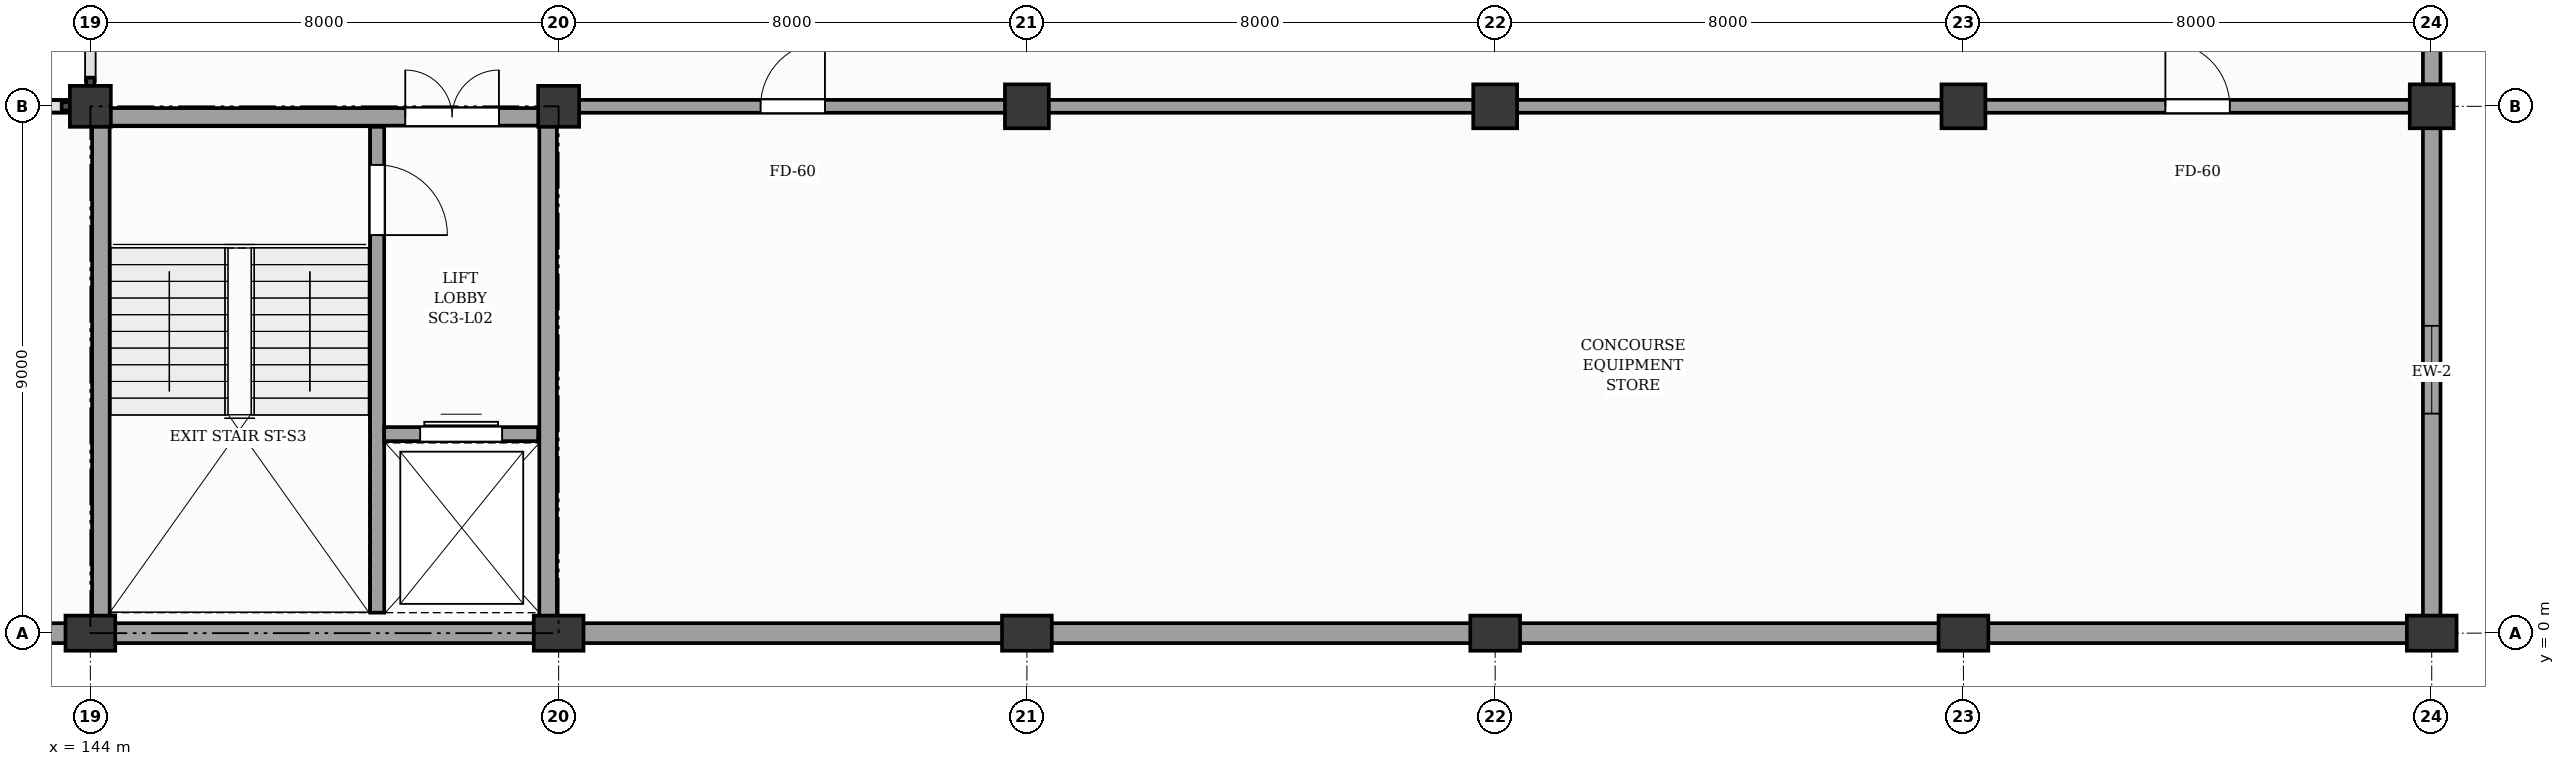
"""IFC4 building model, lengths in metres.
Left out: names, types, materials, properties, quantities, classifications, styles, units other than length and angle.
Written with IfcOpenShell. Run it as: python <this file> out.ifc"""

import sys

from ifc_helpers import new_model, si_unit, direction, frame, frame_2d, origin, origin_2d, place, context, subcontext, project, spatial, rectangle, extrude, element, fill, save


model = new_model("IFC4")
c1 = context("Model", 3, precision=1e-05, world=origin(), true_north=direction((0.0, 1.0)))
c2 = subcontext(c1, "Body", "Model", "MODEL_VIEW")
j1 = project(units=[si_unit("LENGTHUNIT", "METRE"), si_unit("PLANEANGLEUNIT", "RADIAN")], contexts=[c1])
p1 = place(None, origin())
s1 = spatial("IfcSite", under=j1, at=p1, CompositionType="ELEMENT")
p2 = place(p1, origin())
s2 = spatial("IfcBuilding", under=s1, at=p2, CompositionType="ELEMENT")
p3 = place(p2, frame((0.0, 0.0, 9.6)))
s3 = spatial("IfcBuildingStorey", under=s2, at=p3, CompositionType="ELEMENT", Elevation=9.6)
p4 = place(p3, frame((144.0, 0.0, 0.0), z_axis=(0.0, 0.0, 1.0), x_axis=(1.0, 0.0, 0.0)))
e1 = element("IfcColumn", 1, at=p4, inside=s3, PredefinedType="PILASTER", context=c2, shape_type="SweptSolid", body=[
    extrude(rectangle(XDim=0.85, YDim=0.6, at=origin_2d()), origin(), (0.0, 0.0, 1.0), 6.6),
])
p5 = place(p3, frame((144.0, 9.0, 0.0), z_axis=(0.0, 0.0, 1.0), x_axis=(1.0, 0.0, 0.0)))
e2 = element("IfcColumn", 2, at=p5, inside=s3, PredefinedType="COLUMN", context=c2, shape_type="SweptSolid", body=[
    extrude(rectangle(XDim=0.7, YDim=0.7, at=origin_2d()), origin(), (0.0, 0.0, 1.0), 6.6),
])
p6 = place(p3, frame((152.0, 0.0, 0.0), z_axis=(0.0, 0.0, 1.0), x_axis=(1.0, 0.0, 0.0)))
e3 = element("IfcColumn", 3, at=p6, inside=s3, PredefinedType="PILASTER", context=c2, shape_type="SweptSolid", body=[
    extrude(rectangle(XDim=0.85, YDim=0.6, at=origin_2d()), origin(), (0.0, 0.0, 1.0), 6.6),
])
p7 = place(p3, frame((152.0, 9.0, 0.0), z_axis=(0.0, 0.0, 1.0), x_axis=(1.0, 0.0, 0.0)))
e4 = element("IfcColumn", 4, at=p7, inside=s3, PredefinedType="COLUMN", context=c2, shape_type="SweptSolid", body=[
    extrude(rectangle(XDim=0.7, YDim=0.7, at=origin_2d()), origin(), (0.0, 0.0, 1.0), 6.6),
])
p8 = place(p3, frame((160.0, 0.0, 0.0), z_axis=(0.0, 0.0, 1.0), x_axis=(1.0, 0.0, 0.0)))
e5 = element("IfcColumn", 5, at=p8, inside=s3, PredefinedType="PILASTER", context=c2, shape_type="SweptSolid", body=[
    extrude(rectangle(XDim=0.85, YDim=0.6, at=origin_2d()), origin(), (0.0, 0.0, 1.0), 6.6),
])
p9 = place(p3, frame((160.0, 9.0, 0.0), z_axis=(0.0, 0.0, 1.0), x_axis=(1.0, 0.0, 0.0)))
e6 = element("IfcColumn", 6, at=p9, inside=s3, PredefinedType="COLUMN", context=c2, shape_type="SweptSolid", body=[
    extrude(rectangle(XDim=0.75, YDim=0.75, at=origin_2d()), origin(), (0.0, 0.0, 1.0), 6.6),
])
p10 = place(p3, frame((168.0, 0.0, 0.0), z_axis=(0.0, 0.0, 1.0), x_axis=(1.0, 0.0, 0.0)))
e7 = element("IfcColumn", 7, at=p10, inside=s3, PredefinedType="PILASTER", context=c2, shape_type="SweptSolid", body=[
    extrude(rectangle(XDim=0.85, YDim=0.6, at=origin_2d()), origin(), (0.0, 0.0, 1.0), 6.6),
])
p11 = place(p3, frame((168.0, 9.0, 0.0), z_axis=(0.0, 0.0, 1.0), x_axis=(1.0, 0.0, 0.0)))
e8 = element("IfcColumn", 8, at=p11, inside=s3, PredefinedType="COLUMN", context=c2, shape_type="SweptSolid", body=[
    extrude(rectangle(XDim=0.75, YDim=0.75, at=origin_2d()), origin(), (0.0, 0.0, 1.0), 6.6),
])
p12 = place(p3, frame((176.0, 0.0, 0.0), z_axis=(0.0, 0.0, 1.0), x_axis=(1.0, 0.0, 0.0)))
e9 = element("IfcColumn", 9, at=p12, inside=s3, PredefinedType="PILASTER", context=c2, shape_type="SweptSolid", body=[
    extrude(rectangle(XDim=0.85, YDim=0.6, at=origin_2d()), origin(), (0.0, 0.0, 1.0), 6.6),
])
p13 = place(p3, frame((176.0, 9.0, 0.0), z_axis=(0.0, 0.0, 1.0), x_axis=(1.0, 0.0, 0.0)))
e10 = element("IfcColumn", 10, at=p13, inside=s3, PredefinedType="COLUMN", context=c2, shape_type="SweptSolid", body=[
    extrude(rectangle(XDim=0.75, YDim=0.75, at=origin_2d()), origin(), (0.0, 0.0, 1.0), 6.6),
])
p14 = place(p3, frame((184.0, 0.0, 0.0), z_axis=(0.0, 0.0, 1.0), x_axis=(1.0, 0.0, 0.0)))
e11 = element("IfcColumn", 11, at=p14, inside=s3, PredefinedType="PILASTER", context=c2, shape_type="SweptSolid", body=[
    extrude(rectangle(XDim=0.85, YDim=0.6, at=origin_2d()), origin(), (0.0, 0.0, 1.0), 6.6),
])
p15 = place(p3, frame((184.0, 9.0, 0.0), z_axis=(0.0, 0.0, 1.0), x_axis=(1.0, 0.0, 0.0)))
e12 = element("IfcColumn", 12, at=p15, inside=s3, PredefinedType="COLUMN", context=c2, shape_type="SweptSolid", body=[
    extrude(rectangle(XDim=0.75, YDim=0.75, at=origin_2d()), origin(), (0.0, 0.0, 1.0), 6.6),
])
for number, where, z_axis, x_axis in (
    (13, (136.4, 0.0, 0.0), (0.0, 0.0, 1.0), (1.0, 0.0, 0.0)),
    (14, (144.4, 0.0, 0.0), (0.0, 0.0, 1.0), (1.0, 0.0, 0.0)),
    (15, (152.4, 0.0, 0.0), (0.0, 0.0, 1.0), (1.0, 0.0, 0.0)),
    (16, (160.4, 0.0, 0.0), (0.0, 0.0, 1.0), (1.0, 0.0, 0.0)),
    (17, (168.4, 0.0, 0.0), (0.0, 0.0, 1.0), (1.0, 0.0, 0.0)),
    (18, (176.4, 0.0, 0.0), (0.0, 0.0, 1.0), (1.0, 0.0, 0.0)),
):
    element("IfcWall", number, at=place(p3, frame(where, z_axis=z_axis, x_axis=x_axis)), inside=s3, PredefinedType="SOLIDWALL", context=c2, shape_type="SweptSolid", body=[
        extrude(rectangle(XDim=7.2, YDim=0.34, at=frame_2d((3.6, 0.0))), origin(), (0.0, 0.0, 1.0), 5.64),
    ])
p16 = place(p3, frame((184.0, 0.295, 0.0), z_axis=(0.0, 0.0, 1.0), x_axis=(0.0, 1.0, 0.0)))
e19 = element("IfcWall", 19, at=p16, inside=s3, PredefinedType="SOLIDWALL", context=c2, shape_type="SweptSolid", body=[
    extrude(rectangle(XDim=8.335, YDim=0.3, at=frame_2d((4.167, 0.0))), origin(), (0.0, 0.0, 1.0), 5.51),
])
p17 = place(p16, frame((3.455, 0.0, 0.95)))
e20 = element("IfcOpeningElement", 20, at=p17, cuts=e19, PredefinedType="OPENING", context=c2, shape_type="SweptSolid", body=[
    extrude(rectangle(XDim=1.5, YDim=1.9, at=frame_2d((0.75, 0.95))), frame((0.0, 0.16, 0.0), z_axis=(0.0, -1.0, 0.0), x_axis=(1.0, 0.0, 0.0)), (0.0, 0.0, 1.0), 0.32),
])
p18 = place(p3, frame((184.0, 9.37, 0.0), z_axis=(0.0, 0.0, 1.0), x_axis=(0.0, 1.0, 0.0)))
e21 = element("IfcWall", 21, at=p18, inside=s3, PredefinedType="SOLIDWALL", context=c2, shape_type="SweptSolid", body=[
    extrude(rectangle(XDim=8.26, YDim=0.3, at=frame_2d((4.13, 0.0))), origin(), (0.0, 0.0, 1.0), 5.51),
])
p19 = place(p18, frame((3.38, 0.0, 0.95)))
e22 = element("IfcOpeningElement", 22, at=p19, cuts=e21, PredefinedType="OPENING", context=c2, shape_type="SweptSolid", body=[
    extrude(rectangle(XDim=1.5, YDim=1.9, at=frame_2d((0.75, 0.95))), frame((0.0, 0.16, 0.0), z_axis=(0.0, -1.0, 0.0), x_axis=(1.0, 0.0, 0.0)), (0.0, 0.0, 1.0), 0.32),
])
p20 = place(p3, frame((148.9, 0.35, 0.0), z_axis=(0.0, 0.0, 1.0), x_axis=(0.0, 1.0, 0.0)))
e23 = element("IfcWall", 23, at=p20, inside=s3, PredefinedType="SHEAR", context=c2, shape_type="SweptSolid", body=[
    extrude(rectangle(XDim=8.3, YDim=0.24, at=frame_2d((4.15, 0.0))), origin(), (0.0, 0.0, 1.0), 6.32),
])
p21 = place(p20, frame((6.45, 0.0, 0.0)))
e24 = element("IfcOpeningElement", 24, at=p21, cuts=e23, PredefinedType="OPENING", context=c2, shape_type="SweptSolid", body=[
    extrude(rectangle(XDim=1.2, YDim=2.15, at=frame_2d((0.6, 1.075))), frame((0.0, 0.13, 0.0), z_axis=(0.0, -1.0, 0.0), x_axis=(1.0, 0.0, 0.0)), (0.0, 0.0, 1.0), 0.26),
])
p22 = place(p3, frame((149.02, 3.4, 0.0), z_axis=(0.0, 0.0, 1.0), x_axis=(1.0, 0.0, 0.0)))
e25 = element("IfcWall", 25, at=p22, inside=s3, PredefinedType="SHEAR", context=c2, shape_type="SweptSolid", body=[
    extrude(rectangle(XDim=2.63, YDim=0.24, at=frame_2d((1.315, 0.0))), origin(), (0.0, 0.0, 1.0), 6.32),
])
p23 = place(p22, frame((0.615, 0.0, 0.0)))
e26 = element("IfcOpeningElement", 26, at=p23, cuts=e25, PredefinedType="OPENING", context=c2, shape_type="SweptSolid", body=[
    extrude(rectangle(XDim=1.4, YDim=2.15, at=frame_2d((0.7, 1.075))), frame((0.0, 0.13, 0.0), z_axis=(0.0, -1.0, 0.0), x_axis=(1.0, 0.0, 0.0)), (0.0, 0.0, 1.0), 0.26),
])
for number, where, z_axis, x_axis in (
    (27, (144.18, 0.18, 0.0), (0.0, 0.0, 1.0), (0.0, 1.0, 0.0)),
    (28, (151.82, 0.18, 0.0), (0.0, 0.0, 1.0), (0.0, 1.0, 0.0)),
):
    element("IfcWall", number, at=place(p3, frame(where, z_axis=z_axis, x_axis=x_axis)), inside=s3, PredefinedType="SHEAR", context=c2, shape_type="SweptSolid", body=[
        extrude(rectangle(XDim=8.64, YDim=0.3, at=frame_2d((4.32, 0.0))), origin(), (0.0, 0.0, 1.0), 6.32),
    ])
p24 = place(p3, frame((144.03, 8.82, 0.0), z_axis=(0.0, 0.0, 1.0), x_axis=(1.0, 0.0, 0.0)))
e29 = element("IfcWall", 29, at=p24, inside=s3, PredefinedType="SHEAR", context=c2, shape_type="SweptSolid", body=[
    extrude(rectangle(XDim=7.94, YDim=0.3, at=frame_2d((3.97, 0.0))), origin(), (0.0, 0.0, 1.0), 6.32),
])
p25 = place(p24, frame((5.35, 0.0, 0.0)))
e30 = element("IfcOpeningElement", 30, at=p25, cuts=e29, PredefinedType="OPENING", context=c2, shape_type="SweptSolid", body=[
    extrude(rectangle(XDim=1.6, YDim=2.15, at=frame_2d((0.8, 1.075))), frame((0.0, 0.16, 0.0), z_axis=(0.0, -1.0, 0.0), x_axis=(1.0, 0.0, 0.0)), (0.0, 0.0, 1.0), 0.32),
])
p26 = place(p3, frame((136.3, 9.0, 0.0), z_axis=(0.0, 0.0, 1.0), x_axis=(1.0, 0.0, 0.0)))
e31 = element("IfcWall", 31, at=p26, inside=s3, PredefinedType="SOLIDWALL", context=c2, shape_type="SweptSolid", body=[
    extrude(rectangle(XDim=7.4, YDim=0.22, at=frame_2d((3.7, 0.0))), origin(), (0.0, 0.0, 1.0), 5.5),
])
p27 = place(p3, frame((152.3, 9.0, 0.0), z_axis=(0.0, 0.0, 1.0), x_axis=(1.0, 0.0, 0.0)))
e32 = element("IfcWall", 32, at=p27, inside=s3, PredefinedType="SOLIDWALL", context=c2, shape_type="SweptSolid", body=[
    extrude(rectangle(XDim=7.4, YDim=0.22, at=frame_2d((3.7, 0.0))), origin(), (0.0, 0.0, 1.0), 5.5),
])
p28 = place(p27, frame((3.15, 0.0, 0.0)))
e33 = element("IfcOpeningElement", 33, at=p28, cuts=e32, PredefinedType="OPENING", context=c2, shape_type="SweptSolid", body=[
    extrude(rectangle(XDim=1.1, YDim=2.15, at=frame_2d((0.55, 1.075))), frame((0.0, 0.12, 0.0), z_axis=(0.0, -1.0, 0.0), x_axis=(1.0, 0.0, 0.0)), (0.0, 0.0, 1.0), 0.24),
])
for number, where, z_axis, x_axis in (
    (34, (160.3, 9.0, 0.0), (0.0, 0.0, 1.0), (1.0, 0.0, 0.0)),
    (35, (168.3, 9.0, 0.0), (0.0, 0.0, 1.0), (1.0, 0.0, 0.0)),
):
    element("IfcWall", number, at=place(p3, frame(where, z_axis=z_axis, x_axis=x_axis)), inside=s3, PredefinedType="SOLIDWALL", context=c2, shape_type="SweptSolid", body=[
        extrude(rectangle(XDim=7.4, YDim=0.22, at=frame_2d((3.7, 0.0))), origin(), (0.0, 0.0, 1.0), 5.5),
    ])
p29 = place(p3, frame((176.3, 9.0, 0.0), z_axis=(0.0, 0.0, 1.0), x_axis=(1.0, 0.0, 0.0)))
e36 = element("IfcWall", 36, at=p29, inside=s3, PredefinedType="SOLIDWALL", context=c2, shape_type="SweptSolid", body=[
    extrude(rectangle(XDim=7.4, YDim=0.22, at=frame_2d((3.7, 0.0))), origin(), (0.0, 0.0, 1.0), 5.5),
])
p30 = place(p29, frame((3.15, 0.0, 0.0)))
e37 = element("IfcOpeningElement", 37, at=p30, cuts=e36, PredefinedType="OPENING", context=c2, shape_type="SweptSolid", body=[
    extrude(rectangle(XDim=1.1, YDim=2.15, at=frame_2d((0.55, 1.075))), frame((0.0, 0.12, 0.0), z_axis=(0.0, -1.0, 0.0), x_axis=(1.0, 0.0, 0.0)), (0.0, 0.0, 1.0), 0.24),
])
p31 = place(p17, origin())
e38 = element("IfcWindow", 38, at=p31, inside=s3, PartitioningType="SINGLE_PANEL", PredefinedType="WINDOW", context=c2, shape_type="SweptSolid", body=[
    extrude(rectangle(XDim=1.5, YDim=1.9, at=frame_2d((0.75, 0.95))), frame((0.0, 0.03, 0.0), z_axis=(0.0, -1.0, 0.0), x_axis=(1.0, 0.0, 0.0)), (0.0, 0.0, 1.0), 0.06),
])
fill(e20, e38)
p32 = place(p21, frame((1.2, 0.0, 0.0), z_axis=(0.0, 0.0, 1.0), x_axis=(-1.0, 0.0, 0.0)))
e39 = element("IfcDoor", 39, at=p32, inside=s3, OperationType="SINGLE_SWING_LEFT", PredefinedType="DOOR", context=c2, shape_type="SweptSolid", body=[
    extrude(rectangle(XDim=1.2, YDim=2.15, at=frame_2d((0.6, 1.075))), frame((0.0, 0.025, 0.0), z_axis=(0.0, -1.0, 0.0), x_axis=(1.0, 0.0, 0.0)), (0.0, 0.0, 1.0), 0.05),
])
fill(e24, e39)
p33 = place(p23, origin())
e40 = element("IfcDoor", 40, at=p33, inside=s3, OperationType="DOUBLE_DOOR_SLIDING", PredefinedType="DOOR", context=c2, shape_type="SweptSolid", body=[
    extrude(rectangle(XDim=1.4, YDim=2.15, at=frame_2d((0.7, 1.075))), frame((0.0, 0.025, 0.0), z_axis=(0.0, -1.0, 0.0), x_axis=(1.0, 0.0, 0.0)), (0.0, 0.0, 1.0), 0.05),
])
fill(e26, e40)
p34 = place(p25, origin())
e41 = element("IfcDoor", 41, at=p34, inside=s3, OperationType="DOUBLE_DOOR_SINGLE_SWING", PredefinedType="DOOR", context=c2, shape_type="SweptSolid", body=[
    extrude(rectangle(XDim=1.6, YDim=2.15, at=frame_2d((0.8, 1.075))), frame((0.0, 0.025, 0.0), z_axis=(0.0, -1.0, 0.0), x_axis=(1.0, 0.0, 0.0)), (0.0, 0.0, 1.0), 0.05),
])
fill(e30, e41)
p35 = place(p28, origin())
e42 = element("IfcDoor", 42, at=p35, inside=s3, OperationType="SINGLE_SWING_RIGHT", PredefinedType="DOOR", context=c2, shape_type="SweptSolid", body=[
    extrude(rectangle(XDim=1.1, YDim=2.15, at=frame_2d((0.55, 1.075))), frame((0.0, 0.025, 0.0), z_axis=(0.0, -1.0, 0.0), x_axis=(1.0, 0.0, 0.0)), (0.0, 0.0, 1.0), 0.05),
])
fill(e33, e42)
p36 = place(p30, origin())
e43 = element("IfcDoor", 43, at=p36, inside=s3, OperationType="SINGLE_SWING_LEFT", PredefinedType="DOOR", context=c2, shape_type="SweptSolid", body=[
    extrude(rectangle(XDim=1.1, YDim=2.15, at=frame_2d((0.55, 1.075))), frame((0.0, 0.025, 0.0), z_axis=(0.0, -1.0, 0.0), x_axis=(1.0, 0.0, 0.0)), (0.0, 0.0, 1.0), 0.05),
])
fill(e37, e43)
save(model, sys.argv[1])
